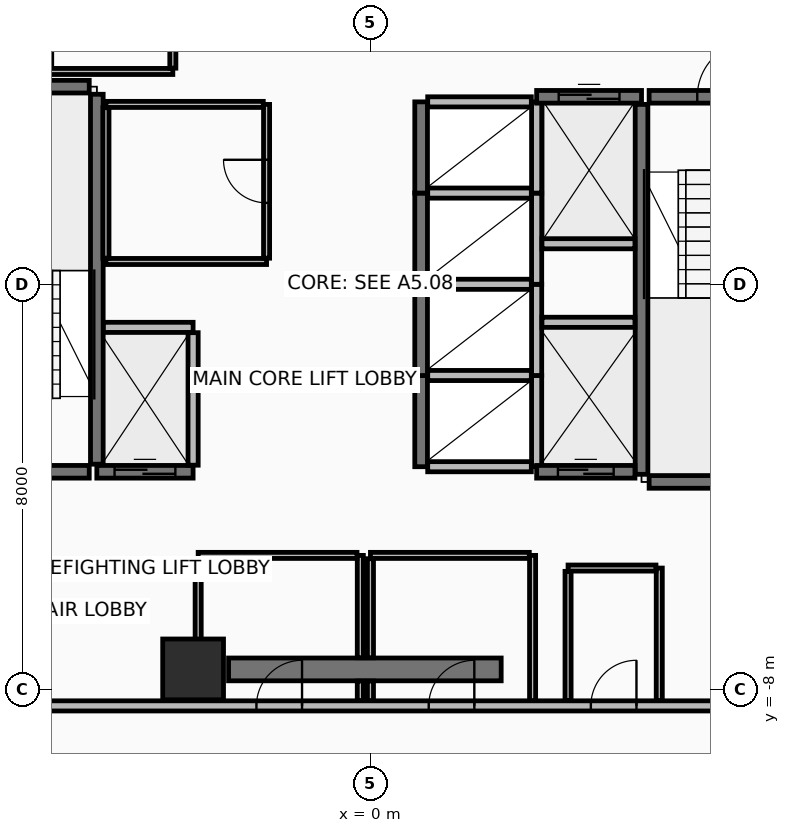
"""IFC4 building model, lengths in metres.
Left out: names, types, materials, properties, quantities, classifications, styles, units other than length and angle.
Written with IfcOpenShell. Run it as: python <this file> out.ifc"""

import sys

from ifc_helpers import new_model, si_unit, direction, frame, frame_2d, origin, origin_2d, place, context, subcontext, project, spatial, rectangle, extrude, element, fill, save


model = new_model("IFC4")
c1 = context("Model", 3, precision=1e-05, world=origin(), true_north=direction((0.0, 1.0)))
c2 = subcontext(c1, "Body", "Model", "MODEL_VIEW")
j1 = project(units=[si_unit("LENGTHUNIT", "METRE"), si_unit("PLANEANGLEUNIT", "RADIAN")], contexts=[c1])
p1 = place(None, origin())
s1 = spatial("IfcSite", under=j1, at=p1, CompositionType="ELEMENT")
p2 = place(p1, origin())
s2 = spatial("IfcBuilding", under=s1, at=p2, CompositionType="ELEMENT")
p3 = place(p2, frame((0.0, 0.0, 142.4)))
s3 = spatial("IfcBuildingStorey", under=s2, at=p3, CompositionType="ELEMENT", Elevation=142.4)
p4 = place(p3, frame((-3.5, -7.6, 0.0), z_axis=(0.0, 0.0, 1.0), x_axis=(1.0, 0.0, 0.0)))
e1 = element("IfcColumn", 1, at=p4, inside=s3, PredefinedType="COLUMN", context=c2, shape_type="SweptSolid", body=[
    extrude(rectangle(XDim=1.2, YDim=1.2, at=origin_2d()), origin(), (0.0, 0.0, 1.0), 3.6),
])
p5 = place(p3, frame((-2.8, -7.6, 0.0), z_axis=(0.0, 0.0, 1.0), x_axis=(1.0, 0.0, 0.0)))
e2 = element("IfcWall", 2, at=p5, inside=s3, PredefinedType="SHEAR", context=c2, shape_type="SweptSolid", body=[
    extrude(rectangle(XDim=5.38, YDim=0.45, at=frame_2d((2.69, 0.0))), origin(), (0.0, 0.0, 1.0), 3.41),
])
p6 = place(p3, frame((-9.62, -8.32, 0.0), z_axis=(0.0, 0.0, 1.0), x_axis=(1.0, 0.0, 0.0)))
e3 = element("IfcWall", 3, at=p6, inside=s3, PredefinedType="PARTITIONING", context=c2, shape_type="SweptSolid", body=[
    extrude(rectangle(XDim=19.24, YDim=0.2, at=frame_2d((9.62, 0.0))), origin(), (0.0, 0.0, 1.0), 2.855),
])
p7 = place(p6, frame((7.37, 0.0, 0.0)))
e4 = element("IfcOpeningElement", 4, at=p7, cuts=e3, PredefinedType="OPENING", context=c2, shape_type="SweptSolid", body=[
    extrude(rectangle(XDim=0.9, YDim=2.1, at=frame_2d((0.45, 1.05))), frame((0.0, 0.11, 0.0), z_axis=(0.0, -1.0, 0.0), x_axis=(1.0, 0.0, 0.0)), (0.0, 0.0, 1.0), 0.22),
])
p8 = place(p6, frame((10.77, 0.0, 0.0)))
e5 = element("IfcOpeningElement", 5, at=p8, cuts=e3, PredefinedType="OPENING", context=c2, shape_type="SweptSolid", body=[
    extrude(rectangle(XDim=0.9, YDim=2.1, at=frame_2d((0.45, 1.05))), frame((0.0, 0.11, 0.0), z_axis=(0.0, -1.0, 0.0), x_axis=(1.0, 0.0, 0.0)), (0.0, 0.0, 1.0), 0.22),
])
p9 = place(p6, frame((13.97, 0.0, 0.0)))
e6 = element("IfcOpeningElement", 6, at=p9, cuts=e3, PredefinedType="OPENING", context=c2, shape_type="SweptSolid", body=[
    extrude(rectangle(XDim=0.9, YDim=2.1, at=frame_2d((0.45, 1.05))), frame((0.0, 0.11, 0.0), z_axis=(0.0, -1.0, 0.0), x_axis=(1.0, 0.0, 0.0)), (0.0, 0.0, 1.0), 0.22),
])
p10 = place(p3, frame((-5.4, -3.55, 0.0), z_axis=(0.0, 0.0, 1.0), x_axis=(0.0, 1.0, 0.0)))
e7 = element("IfcWall", 7, at=p10, inside=s3, PredefinedType="SHEAR", context=c2, shape_type="SweptSolid", body=[
    extrude(rectangle(XDim=7.3, YDim=0.25, at=frame_2d((3.65, 0.0))), origin(), (0.0, 0.0, 1.0), 3.41),
])
p11 = place(p3, frame((-8.5, -3.7, 0.0), z_axis=(0.0, 0.0, 1.0), x_axis=(1.0, 0.0, 0.0)))
e8 = element("IfcWall", 8, at=p11, inside=s3, PredefinedType="SHEAR", context=c2, shape_type="SweptSolid", body=[
    extrude(rectangle(XDim=2.95, YDim=0.25, at=frame_2d((1.475, 0.0))), origin(), (0.0, 0.0, 1.0), 3.41),
])
p12 = place(p11, frame((0.9, 0.0, 0.0)))
e9 = element("IfcOpeningElement", 9, at=p12, cuts=e8, PredefinedType="OPENING", context=c2, shape_type="SweptSolid", body=[
    extrude(rectangle(XDim=1.1, YDim=2.15, at=frame_2d((0.55, 1.075))), frame((0.0, 0.135, 0.0), z_axis=(0.0, -1.0, 0.0), x_axis=(1.0, 0.0, 0.0)), (0.0, 0.0, 1.0), 0.27),
])
p13 = place(p3, frame((-8.5, 3.9, 0.0), z_axis=(0.0, 0.0, 1.0), x_axis=(1.0, 0.0, 0.0)))
e10 = element("IfcWall", 10, at=p13, inside=s3, PredefinedType="SHEAR", context=c2, shape_type="SweptSolid", body=[
    extrude(rectangle(XDim=2.95, YDim=0.25, at=frame_2d((1.475, 0.0))), origin(), (0.0, 0.0, 1.0), 3.41),
])
p14 = place(p3, frame((5.35, -3.75, 0.0), z_axis=(0.0, 0.0, 1.0), x_axis=(0.0, 1.0, 0.0)))
e11 = element("IfcWall", 11, at=p14, inside=s3, PredefinedType="SHEAR", context=c2, shape_type="SweptSolid", body=[
    extrude(rectangle(XDim=7.3, YDim=0.25, at=frame_2d((3.65, 0.0))), origin(), (0.0, 0.0, 1.0), 3.41),
])
p15 = place(p3, frame((5.5, 3.7, 0.0), z_axis=(0.0, 0.0, 1.0), x_axis=(1.0, 0.0, 0.0)))
e12 = element("IfcWall", 12, at=p15, inside=s3, PredefinedType="SHEAR", context=c2, shape_type="SweptSolid", body=[
    extrude(rectangle(XDim=3.0, YDim=0.25, at=frame_2d((1.5, 0.0))), origin(), (0.0, 0.0, 1.0), 3.41),
])
p16 = place(p15, frame((0.95, 0.0, 0.0)))
e13 = element("IfcOpeningElement", 13, at=p16, cuts=e12, PredefinedType="OPENING", context=c2, shape_type="SweptSolid", body=[
    extrude(rectangle(XDim=1.1, YDim=2.15, at=frame_2d((0.55, 1.075))), frame((0.0, 0.135, 0.0), z_axis=(0.0, -1.0, 0.0), x_axis=(1.0, 0.0, 0.0)), (0.0, 0.0, 1.0), 0.27),
])
p17 = place(p3, frame((5.5, -3.9, 0.0), z_axis=(0.0, 0.0, 1.0), x_axis=(1.0, 0.0, 0.0)))
e14 = element("IfcWall", 14, at=p17, inside=s3, PredefinedType="SHEAR", context=c2, shape_type="SweptSolid", body=[
    extrude(rectangle(XDim=3.0, YDim=0.25, at=frame_2d((1.5, 0.0))), origin(), (0.0, 0.0, 1.0), 3.41),
])
p18 = place(p3, frame((1.0, -3.6, 0.0), z_axis=(0.0, 0.0, 1.0), x_axis=(0.0, 1.0, 0.0)))
e15 = element("IfcWall", 15, at=p18, inside=s3, PredefinedType="SHEAR", context=c2, shape_type="SweptSolid", body=[
    extrude(rectangle(XDim=1.8, YDim=0.25, at=frame_2d((0.9, 0.0))), origin(), (0.0, 0.0, 1.0), 3.41),
])
p19 = place(p3, frame((3.28, -3.6, 0.0), z_axis=(0.0, 0.0, 1.0), x_axis=(0.0, 1.0, 0.0)))
e16 = element("IfcWall", 16, at=p19, inside=s3, PredefinedType="PARTITIONING", context=c2, shape_type="SweptSolid", body=[
    extrude(rectangle(XDim=1.8, YDim=0.2, at=frame_2d((0.9, 0.0))), origin(), (0.0, 0.0, 1.0), 3.41),
])
for number, where, z_axis, x_axis in (
    (17, (1.13, -3.6, 0.0), (0.0, 0.0, 1.0), (1.0, 0.0, 0.0)),
    (18, (1.13, -1.8, 0.0), (0.0, 0.0, 1.0), (1.0, 0.0, 0.0)),
):
    element("IfcWall", number, at=place(p3, frame(where, z_axis=z_axis, x_axis=x_axis)), inside=s3, PredefinedType="PARTITIONING", context=c2, shape_type="SweptSolid", body=[
        extrude(rectangle(XDim=2.045, YDim=0.2, at=frame_2d((1.022, 0.0))), origin(), (0.0, 0.0, 1.0), 3.41),
    ])
p20 = place(p3, frame((1.0, -1.8, 0.0), z_axis=(0.0, 0.0, 1.0), x_axis=(0.0, 1.0, 0.0)))
e19 = element("IfcWall", 19, at=p20, inside=s3, PredefinedType="SHEAR", context=c2, shape_type="SweptSolid", body=[
    extrude(rectangle(XDim=1.8, YDim=0.25, at=frame_2d((0.9, 0.0))), origin(), (0.0, 0.0, 1.0), 3.41),
])
p21 = place(p3, frame((3.28, -1.8, 0.0), z_axis=(0.0, 0.0, 1.0), x_axis=(0.0, 1.0, 0.0)))
e20 = element("IfcWall", 20, at=p21, inside=s3, PredefinedType="PARTITIONING", context=c2, shape_type="SweptSolid", body=[
    extrude(rectangle(XDim=1.8, YDim=0.2, at=frame_2d((0.9, 0.0))), origin(), (0.0, 0.0, 1.0), 3.41),
])
p22 = place(p3, frame((1.13, 0.0, 0.0), z_axis=(0.0, 0.0, 1.0), x_axis=(1.0, 0.0, 0.0)))
e21 = element("IfcWall", 21, at=p22, inside=s3, PredefinedType="PARTITIONING", context=c2, shape_type="SweptSolid", body=[
    extrude(rectangle(XDim=2.045, YDim=0.2, at=frame_2d((1.022, 0.0))), origin(), (0.0, 0.0, 1.0), 3.41),
])
p23 = place(p3, frame((1.0, 0.0, 0.0), z_axis=(0.0, 0.0, 1.0), x_axis=(0.0, 1.0, 0.0)))
e22 = element("IfcWall", 22, at=p23, inside=s3, PredefinedType="SHEAR", context=c2, shape_type="SweptSolid", body=[
    extrude(rectangle(XDim=1.8, YDim=0.25, at=frame_2d((0.9, 0.0))), origin(), (0.0, 0.0, 1.0), 3.41),
])
p24 = place(p3, frame((3.28, 0.0, 0.0), z_axis=(0.0, 0.0, 1.0), x_axis=(0.0, 1.0, 0.0)))
e23 = element("IfcWall", 23, at=p24, inside=s3, PredefinedType="PARTITIONING", context=c2, shape_type="SweptSolid", body=[
    extrude(rectangle(XDim=1.8, YDim=0.2, at=frame_2d((0.9, 0.0))), origin(), (0.0, 0.0, 1.0), 3.41),
])
p25 = place(p3, frame((1.13, 1.8, 0.0), z_axis=(0.0, 0.0, 1.0), x_axis=(1.0, 0.0, 0.0)))
e24 = element("IfcWall", 24, at=p25, inside=s3, PredefinedType="PARTITIONING", context=c2, shape_type="SweptSolid", body=[
    extrude(rectangle(XDim=2.045, YDim=0.2, at=frame_2d((1.022, 0.0))), origin(), (0.0, 0.0, 1.0), 3.41),
])
p26 = place(p3, frame((1.0, 1.8, 0.0), z_axis=(0.0, 0.0, 1.0), x_axis=(0.0, 1.0, 0.0)))
e25 = element("IfcWall", 25, at=p26, inside=s3, PredefinedType="SHEAR", context=c2, shape_type="SweptSolid", body=[
    extrude(rectangle(XDim=1.8, YDim=0.25, at=frame_2d((0.9, 0.0))), origin(), (0.0, 0.0, 1.0), 3.41),
])
p27 = place(p3, frame((3.28, 1.8, 0.0), z_axis=(0.0, 0.0, 1.0), x_axis=(0.0, 1.0, 0.0)))
e26 = element("IfcWall", 26, at=p27, inside=s3, PredefinedType="PARTITIONING", context=c2, shape_type="SweptSolid", body=[
    extrude(rectangle(XDim=1.8, YDim=0.2, at=frame_2d((0.9, 0.0))), origin(), (0.0, 0.0, 1.0), 3.41),
])
p28 = place(p3, frame((1.13, 3.6, 0.0), z_axis=(0.0, 0.0, 1.0), x_axis=(1.0, 0.0, 0.0)))
e27 = element("IfcWall", 27, at=p28, inside=s3, PredefinedType="PARTITIONING", context=c2, shape_type="SweptSolid", body=[
    extrude(rectangle(XDim=2.045, YDim=0.2, at=frame_2d((1.022, 0.0))), origin(), (0.0, 0.0, 1.0), 2.605),
])
p29 = place(p3, frame((-5.4, -3.7, 0.0), z_axis=(0.0, 0.0, 1.0), x_axis=(1.0, 0.0, 0.0)))
e28 = element("IfcWall", 28, at=p29, inside=s3, PredefinedType="SHEAR", context=c2, shape_type="SweptSolid", body=[
    extrude(rectangle(XDim=1.9, YDim=0.25, at=frame_2d((0.95, 0.0))), origin(), (0.0, 0.0, 1.0), 3.41),
])
p30 = place(p29, frame((0.35, 0.0, 0.0)))
e29 = element("IfcOpeningElement", 29, at=p30, cuts=e28, PredefinedType="OPENING", context=c2, shape_type="SweptSolid", body=[
    extrude(rectangle(XDim=1.2, YDim=2.2, at=frame_2d((0.6, 1.1))), frame((0.0, 0.135, 0.0), z_axis=(0.0, -1.0, 0.0), x_axis=(1.0, 0.0, 0.0)), (0.0, 0.0, 1.0), 0.27),
])
p31 = place(p3, frame((-5.27, -0.85, 0.0), z_axis=(0.0, 0.0, 1.0), x_axis=(1.0, 0.0, 0.0)))
e30 = element("IfcWall", 30, at=p31, inside=s3, PredefinedType="PARTITIONING", context=c2, shape_type="SweptSolid", body=[
    extrude(rectangle(XDim=1.77, YDim=0.2, at=frame_2d((0.885, 0.0))), origin(), (0.0, 0.0, 1.0), 3.41),
])
p32 = place(p3, frame((-3.5, -3.57, 0.0), z_axis=(0.0, 0.0, 1.0), x_axis=(0.0, 1.0, 0.0)))
e31 = element("IfcWall", 31, at=p32, inside=s3, PredefinedType="PARTITIONING", context=c2, shape_type="SweptSolid", body=[
    extrude(rectangle(XDim=2.615, YDim=0.2, at=frame_2d((1.308, 0.0))), origin(), (0.0, 0.0, 1.0), 3.41),
])
p33 = place(p3, frame((3.28, 3.7, 0.0), z_axis=(0.0, 0.0, 1.0), x_axis=(1.0, 0.0, 0.0)))
e32 = element("IfcWall", 32, at=p33, inside=s3, PredefinedType="SHEAR", context=c2, shape_type="SweptSolid", body=[
    extrude(rectangle(XDim=2.07, YDim=0.25, at=frame_2d((1.035, 0.0))), origin(), (0.0, 0.0, 1.0), 3.41),
])
p34 = place(p33, frame((0.435, 0.0, 0.0)))
e33 = element("IfcOpeningElement", 33, at=p34, cuts=e32, PredefinedType="OPENING", context=c2, shape_type="SweptSolid", body=[
    extrude(rectangle(XDim=1.2, YDim=2.2, at=frame_2d((0.6, 1.1))), frame((0.0, 0.135, 0.0), z_axis=(0.0, -1.0, 0.0), x_axis=(1.0, 0.0, 0.0)), (0.0, 0.0, 1.0), 0.27),
])
p35 = place(p3, frame((3.385, 0.8, 0.0), z_axis=(0.0, 0.0, 1.0), x_axis=(1.0, 0.0, 0.0)))
e34 = element("IfcWall", 34, at=p35, inside=s3, PredefinedType="PARTITIONING", context=c2, shape_type="SweptSolid", body=[
    extrude(rectangle(XDim=1.835, YDim=0.2, at=frame_2d((0.917, 0.0))), origin(), (0.0, 0.0, 1.0), 3.41),
])
p36 = place(p3, frame((3.28, -3.7, 0.0), z_axis=(0.0, 0.0, 1.0), x_axis=(1.0, 0.0, 0.0)))
e35 = element("IfcWall", 35, at=p36, inside=s3, PredefinedType="SHEAR", context=c2, shape_type="SweptSolid", body=[
    extrude(rectangle(XDim=1.94, YDim=0.25, at=frame_2d((0.97, 0.0))), origin(), (0.0, 0.0, 1.0), 3.41),
])
p37 = place(p36, frame((0.42, 0.0, 0.0)))
e36 = element("IfcOpeningElement", 36, at=p37, cuts=e35, PredefinedType="OPENING", context=c2, shape_type="SweptSolid", body=[
    extrude(rectangle(XDim=1.1, YDim=2.2, at=frame_2d((0.55, 1.1))), frame((0.0, 0.135, 0.0), z_axis=(0.0, -1.0, 0.0), x_axis=(1.0, 0.0, 0.0)), (0.0, 0.0, 1.0), 0.27),
])
p38 = place(p3, frame((3.385, -0.75, 0.0), z_axis=(0.0, 0.0, 1.0), x_axis=(1.0, 0.0, 0.0)))
e37 = element("IfcWall", 37, at=p38, inside=s3, PredefinedType="PARTITIONING", context=c2, shape_type="SweptSolid", body=[
    extrude(rectangle(XDim=1.835, YDim=0.2, at=frame_2d((0.917, 0.0))), origin(), (0.0, 0.0, 1.0), 3.41),
])
p39 = place(p3, frame((-5.22, 0.45, 0.0), z_axis=(0.0, 0.0, 1.0), x_axis=(1.0, 0.0, 0.0)))
e38 = element("IfcWall", 38, at=p39, inside=s3, PredefinedType="PARTITIONING", context=c2, shape_type="SweptSolid", body=[
    extrude(rectangle(XDim=3.17, YDim=0.12, at=frame_2d((1.585, 0.0))), origin(), (0.0, 0.0, 1.0), 3.41),
])
p40 = place(p3, frame((-2.05, 0.515, 0.0), z_axis=(0.0, 0.0, 1.0), x_axis=(0.0, 1.0, 0.0)))
e39 = element("IfcWall", 39, at=p40, inside=s3, PredefinedType="PARTITIONING", context=c2, shape_type="SweptSolid", body=[
    extrude(rectangle(XDim=3.035, YDim=0.12, at=frame_2d((1.518, 0.0))), origin(), (0.0, 0.0, 1.0), 3.41),
])
p41 = place(p40, frame((1.092, 0.0, 0.0)))
e40 = element("IfcOpeningElement", 40, at=p41, cuts=e39, PredefinedType="OPENING", context=c2, shape_type="SweptSolid", body=[
    extrude(rectangle(XDim=0.85, YDim=2.1, at=frame_2d((0.425, 1.05))), frame((0.0, 0.07, 0.0), z_axis=(0.0, -1.0, 0.0), x_axis=(1.0, 0.0, 0.0)), (0.0, 0.0, 1.0), 0.14),
])
p42 = place(p3, frame((-2.115, 3.55, 0.0), z_axis=(0.0, 0.0, 1.0), x_axis=(-1.0, 0.0, 0.0)))
e41 = element("IfcWall", 41, at=p42, inside=s3, PredefinedType="PARTITIONING", context=c2, shape_type="SweptSolid", body=[
    extrude(rectangle(XDim=3.105, YDim=0.12, at=frame_2d((1.552, 0.0))), origin(), (0.0, 0.0, 1.0), 3.41),
])
p43 = place(p3, frame((-5.22, 3.485, 0.0), z_axis=(0.0, 0.0, 1.0), x_axis=(0.0, -1.0, 0.0)))
e42 = element("IfcWall", 42, at=p43, inside=s3, PredefinedType="PARTITIONING", context=c2, shape_type="SweptSolid", body=[
    extrude(rectangle(XDim=2.97, YDim=0.12, at=frame_2d((1.485, 0.0))), origin(), (0.0, 0.0, 1.0), 3.41),
])
p44 = place(p3, frame((-0.2, -8.215, 0.0), z_axis=(0.0, 0.0, 1.0), x_axis=(0.0, 1.0, 0.0)))
e43 = element("IfcWall", 43, at=p44, inside=s3, PredefinedType="PARTITIONING", context=c2, shape_type="SweptSolid", body=[
    extrude(rectangle(XDim=0.385, YDim=0.12, at=frame_2d((0.192, 0.0))), origin(), (0.0, 0.0, 1.0), 2.605),
])
p45 = place(p3, frame((-0.2, -7.37, 0.0), z_axis=(0.0, 0.0, 1.0), x_axis=(0.0, 1.0, 0.0)))
e44 = element("IfcWall", 44, at=p45, inside=s3, PredefinedType="PARTITIONING", context=c2, shape_type="SweptSolid", body=[
    extrude(rectangle(XDim=2.02, YDim=0.12, at=frame_2d((1.01, 0.0))), origin(), (0.0, 0.0, 1.0), 2.605),
])
p46 = place(p3, frame((-0.265, -5.35, 0.0), z_axis=(0.0, 0.0, 1.0), x_axis=(-1.0, 0.0, 0.0)))
e45 = element("IfcWall", 45, at=p46, inside=s3, PredefinedType="PARTITIONING", context=c2, shape_type="SweptSolid", body=[
    extrude(rectangle(XDim=3.135, YDim=0.12, at=frame_2d((1.567, 0.0))), origin(), (0.0, 0.0, 1.0), 2.605),
])
p47 = place(p3, frame((-3.4, -5.415, 0.0), z_axis=(0.0, 0.0, 1.0), x_axis=(0.0, -1.0, 0.0)))
e46 = element("IfcWall", 46, at=p47, inside=s3, PredefinedType="PARTITIONING", context=c2, shape_type="SweptSolid", body=[
    extrude(rectangle(XDim=2.8, YDim=0.12, at=frame_2d((1.4, 0.0))), origin(), (0.0, 0.0, 1.0), 2.605),
])
p48 = place(p3, frame((3.2, -8.215, 0.0), z_axis=(0.0, 0.0, 1.0), x_axis=(0.0, 1.0, 0.0)))
e47 = element("IfcWall", 47, at=p48, inside=s3, PredefinedType="PARTITIONING", context=c2, shape_type="SweptSolid", body=[
    extrude(rectangle(XDim=2.865, YDim=0.12, at=frame_2d((1.433, 0.0))), origin(), (0.0, 0.0, 1.0), 2.605),
])
p49 = place(p3, frame((3.135, -5.35, 0.0), z_axis=(0.0, 0.0, 1.0), x_axis=(-1.0, 0.0, 0.0)))
e48 = element("IfcWall", 48, at=p49, inside=s3, PredefinedType="PARTITIONING", context=c2, shape_type="SweptSolid", body=[
    extrude(rectangle(XDim=3.135, YDim=0.12, at=frame_2d((1.567, 0.0))), origin(), (0.0, 0.0, 1.0), 3.41),
])
p50 = place(p3, frame((0.0, -5.415, 0.0), z_axis=(0.0, 0.0, 1.0), x_axis=(0.0, -1.0, 0.0)))
e49 = element("IfcWall", 49, at=p50, inside=s3, PredefinedType="PARTITIONING", context=c2, shape_type="SweptSolid", body=[
    extrude(rectangle(XDim=1.955, YDim=0.12, at=frame_2d((0.978, 0.0))), origin(), (0.0, 0.0, 1.0), 2.605),
])
p51 = place(p3, frame((0.0, -7.83, 0.0), z_axis=(0.0, 0.0, 1.0), x_axis=(0.0, -1.0, 0.0)))
e50 = element("IfcWall", 50, at=p51, inside=s3, PredefinedType="PARTITIONING", context=c2, shape_type="SweptSolid", body=[
    extrude(rectangle(XDim=0.385, YDim=0.12, at=frame_2d((0.192, 0.0))), origin(), (0.0, 0.0, 1.0), 2.605),
])
p52 = place(p3, frame((-6.35, 4.2, 0.0), z_axis=(0.0, 0.0, 1.0), x_axis=(1.0, 0.0, 0.0)))
e51 = element("IfcWall", 51, at=p52, inside=s3, PredefinedType="PARTITIONING", context=c2, shape_type="SweptSolid", body=[
    extrude(rectangle(XDim=2.45, YDim=0.12, at=frame_2d((1.225, 0.0))), origin(), (0.0, 0.0, 1.0), 3.41),
])
p53 = place(p3, frame((-3.9, 4.265, 0.0), z_axis=(0.0, 0.0, 1.0), x_axis=(0.0, 1.0, 0.0)))
e52 = element("IfcWall", 52, at=p53, inside=s3, PredefinedType="PARTITIONING", context=c2, shape_type="SweptSolid", body=[
    extrude(rectangle(XDim=3.95, YDim=0.12, at=frame_2d((1.975, 0.0))), origin(), (0.0, 0.0, 1.0), 2.605),
])
p54 = place(p3, frame((5.7, -8.215, 0.0), z_axis=(0.0, 0.0, 1.0), x_axis=(0.0, 1.0, 0.0)))
e53 = element("IfcWall", 53, at=p54, inside=s3, PredefinedType="PARTITIONING", context=c2, shape_type="SweptSolid", body=[
    extrude(rectangle(XDim=2.615, YDim=0.12, at=frame_2d((1.308, 0.0))), origin(), (0.0, 0.0, 1.0), 2.605),
])
p55 = place(p3, frame((5.635, -5.6, 0.0), z_axis=(0.0, 0.0, 1.0), x_axis=(-1.0, 0.0, 0.0)))
e54 = element("IfcWall", 54, at=p55, inside=s3, PredefinedType="PARTITIONING", context=c2, shape_type="SweptSolid", body=[
    extrude(rectangle(XDim=1.735, YDim=0.12, at=frame_2d((0.868, 0.0))), origin(), (0.0, 0.0, 1.0), 3.41),
])
p56 = place(p3, frame((3.9, -5.665, 0.0), z_axis=(0.0, 0.0, 1.0), x_axis=(0.0, -1.0, 0.0)))
e55 = element("IfcWall", 55, at=p56, inside=s3, PredefinedType="PARTITIONING", context=c2, shape_type="SweptSolid", body=[
    extrude(rectangle(XDim=2.55, YDim=0.12, at=frame_2d((1.275, 0.0))), origin(), (0.0, 0.0, 1.0), 2.605),
])
p57 = place(p16, frame((1.1, 0.0, 0.0), z_axis=(0.0, 0.0, 1.0), x_axis=(-1.0, 0.0, 0.0)))
e56 = element("IfcDoor", 56, at=p57, inside=s3, OperationType="SINGLE_SWING_LEFT", PredefinedType="DOOR", context=c2, shape_type="SweptSolid", body=[
    extrude(rectangle(XDim=1.1, YDim=2.15, at=frame_2d((0.55, 1.075))), frame((0.0, 0.025, 0.0), z_axis=(0.0, -1.0, 0.0), x_axis=(1.0, 0.0, 0.0)), (0.0, 0.0, 1.0), 0.05),
])
fill(e13, e56)
p58 = place(p30, origin())
e57 = element("IfcDoor", 57, at=p58, inside=s3, OperationType="SLIDING_TO_RIGHT", PredefinedType="DOOR", context=c2, shape_type="SweptSolid", body=[
    extrude(rectangle(XDim=1.2, YDim=2.2, at=frame_2d((0.6, 1.1))), frame((0.0, 0.025, 0.0), z_axis=(0.0, -1.0, 0.0), x_axis=(1.0, 0.0, 0.0)), (0.0, 0.0, 1.0), 0.05),
])
fill(e29, e57)
p59 = place(p34, origin())
e58 = element("IfcDoor", 58, at=p59, inside=s3, OperationType="SLIDING_TO_RIGHT", PredefinedType="DOOR", context=c2, shape_type="SweptSolid", body=[
    extrude(rectangle(XDim=1.2, YDim=2.2, at=frame_2d((0.6, 1.1))), frame((0.0, 0.025, 0.0), z_axis=(0.0, -1.0, 0.0), x_axis=(1.0, 0.0, 0.0)), (0.0, 0.0, 1.0), 0.05),
])
fill(e33, e58)
p60 = place(p37, origin())
e59 = element("IfcDoor", 59, at=p60, inside=s3, OperationType="SLIDING_TO_LEFT", PredefinedType="DOOR", context=c2, shape_type="SweptSolid", body=[
    extrude(rectangle(XDim=1.1, YDim=2.2, at=frame_2d((0.55, 1.1))), frame((0.0, 0.025, 0.0), z_axis=(0.0, -1.0, 0.0), x_axis=(1.0, 0.0, 0.0)), (0.0, 0.0, 1.0), 0.05),
])
fill(e36, e59)
p61 = place(p41, frame((0.85, 0.0, 0.0), z_axis=(0.0, 0.0, 1.0), x_axis=(-1.0, 0.0, 0.0)))
e60 = element("IfcDoor", 60, at=p61, inside=s3, OperationType="SINGLE_SWING_RIGHT", PredefinedType="DOOR", context=c2, shape_type="SweptSolid", body=[
    extrude(rectangle(XDim=0.85, YDim=2.1, at=frame_2d((0.425, 1.05))), frame((0.0, 0.025, 0.0), z_axis=(0.0, -1.0, 0.0), x_axis=(1.0, 0.0, 0.0)), (0.0, 0.0, 1.0), 0.05),
])
fill(e40, e60)
p62 = place(p7, frame((0.9, 0.0, 0.0), z_axis=(0.0, 0.0, 1.0), x_axis=(-1.0, 0.0, 0.0)))
e61 = element("IfcDoor", 61, at=p62, inside=s3, OperationType="SINGLE_SWING_LEFT", PredefinedType="DOOR", context=c2, shape_type="SweptSolid", body=[
    extrude(rectangle(XDim=0.9, YDim=2.1, at=frame_2d((0.45, 1.05))), frame((0.0, 0.025, 0.0), z_axis=(0.0, -1.0, 0.0), x_axis=(1.0, 0.0, 0.0)), (0.0, 0.0, 1.0), 0.05),
])
fill(e4, e61)
p63 = place(p8, frame((0.9, 0.0, 0.0), z_axis=(0.0, 0.0, 1.0), x_axis=(-1.0, 0.0, 0.0)))
e62 = element("IfcDoor", 62, at=p63, inside=s3, OperationType="SINGLE_SWING_LEFT", PredefinedType="DOOR", context=c2, shape_type="SweptSolid", body=[
    extrude(rectangle(XDim=0.9, YDim=2.1, at=frame_2d((0.45, 1.05))), frame((0.0, 0.025, 0.0), z_axis=(0.0, -1.0, 0.0), x_axis=(1.0, 0.0, 0.0)), (0.0, 0.0, 1.0), 0.05),
])
fill(e5, e62)
p64 = place(p9, frame((0.9, 0.0, 0.0), z_axis=(0.0, 0.0, 1.0), x_axis=(-1.0, 0.0, 0.0)))
e63 = element("IfcDoor", 63, at=p64, inside=s3, OperationType="SINGLE_SWING_LEFT", PredefinedType="DOOR", context=c2, shape_type="SweptSolid", body=[
    extrude(rectangle(XDim=0.9, YDim=2.1, at=frame_2d((0.45, 1.05))), frame((0.0, 0.025, 0.0), z_axis=(0.0, -1.0, 0.0), x_axis=(1.0, 0.0, 0.0)), (0.0, 0.0, 1.0), 0.05),
])
fill(e6, e63)
save(model, sys.argv[1])
